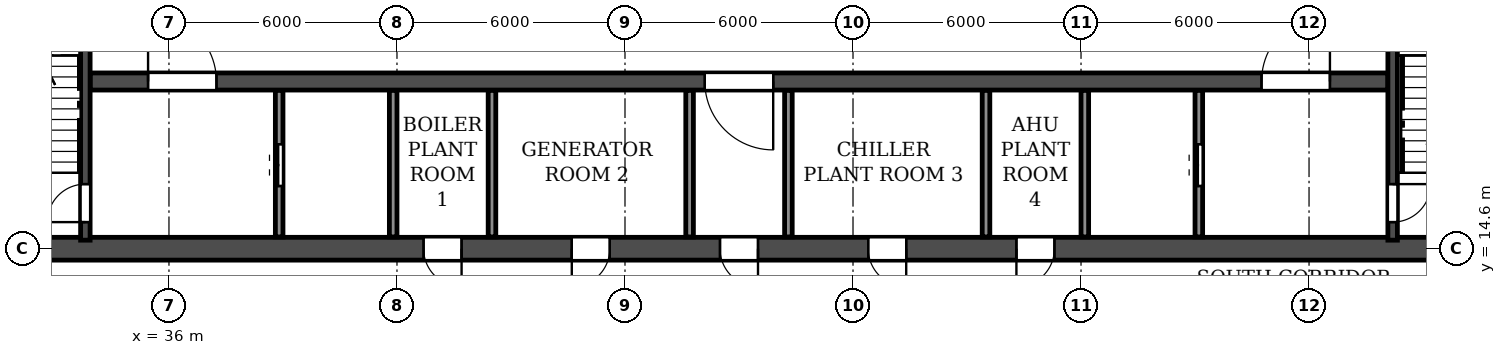
"""IFC4 building model, lengths in metres.
Left out: names, types, materials, properties, quantities, classifications, styles, units other than length and angle.
Written with IfcOpenShell. Run it as: python <this file> out.ifc"""

import sys

from ifc_helpers import new_model, si_unit, direction, frame, frame_2d, origin, place, context, subcontext, project, spatial, rectangle, extrude, element, fill, save


model = new_model("IFC4")
c1 = context("Model", 3, precision=1e-05, world=origin(), true_north=direction((0.0, 1.0)))
c2 = subcontext(c1, "Body", "Model", "MODEL_VIEW")
j1 = project(units=[si_unit("LENGTHUNIT", "METRE"), si_unit("PLANEANGLEUNIT", "RADIAN")], contexts=[c1])
p1 = place(None, origin())
s1 = spatial("IfcSite", under=j1, at=p1, CompositionType="ELEMENT")
p2 = place(p1, origin())
s2 = spatial("IfcBuilding", under=s1, at=p2, CompositionType="ELEMENT")
p3 = place(p2, frame((0.0, 0.0, 165.3)))
s3 = spatial("IfcBuildingStorey", under=s2, at=p3, CompositionType="ELEMENT", Elevation=165.3)
p4 = place(p3, frame((29.7, 14.6, 0.0), z_axis=(0.0, 0.0, 1.0), x_axis=(1.0, 0.0, 0.0)))
e1 = element("IfcWall", 1, at=p4, inside=s3, PredefinedType="SOLIDWALL", context=c2, shape_type="SweptSolid", body=[
    extrude(rectangle(XDim=42.6, YDim=0.6, at=frame_2d((21.3, 0.0))), origin(), (0.0, 0.0, 1.0), 6.38),
])
p5 = place(p4, frame((1.7, 0.0, 0.0)))
e2 = element("IfcOpeningElement", 2, at=p5, cuts=e1, PredefinedType="OPENING", context=c2, shape_type="SweptSolid", body=[
    extrude(rectangle(XDim=1.0, YDim=2.1, at=frame_2d((0.5, 1.05))), frame((0.0, 0.31, 0.0), z_axis=(0.0, -1.0, 0.0), x_axis=(1.0, 0.0, 0.0)), (0.0, 0.0, 1.0), 0.62),
])
p6 = place(p4, frame((13.0, 0.0, 0.0)))
e3 = element("IfcOpeningElement", 3, at=p6, cuts=e1, PredefinedType="OPENING", context=c2, shape_type="SweptSolid", body=[
    extrude(rectangle(XDim=1.0, YDim=2.1, at=frame_2d((0.5, 1.05))), frame((0.0, 0.31, 0.0), z_axis=(0.0, -1.0, 0.0), x_axis=(1.0, 0.0, 0.0)), (0.0, 0.0, 1.0), 0.62),
])
p7 = place(p4, frame((16.9, 0.0, 0.0)))
e4 = element("IfcOpeningElement", 4, at=p7, cuts=e1, PredefinedType="OPENING", context=c2, shape_type="SweptSolid", body=[
    extrude(rectangle(XDim=1.0, YDim=2.1, at=frame_2d((0.5, 1.05))), frame((0.0, 0.31, 0.0), z_axis=(0.0, -1.0, 0.0), x_axis=(1.0, 0.0, 0.0)), (0.0, 0.0, 1.0), 0.62),
])
p8 = place(p4, frame((20.8, 0.0, 0.0)))
e5 = element("IfcOpeningElement", 5, at=p8, cuts=e1, PredefinedType="OPENING", context=c2, shape_type="SweptSolid", body=[
    extrude(rectangle(XDim=1.0, YDim=2.1, at=frame_2d((0.5, 1.05))), frame((0.0, 0.31, 0.0), z_axis=(0.0, -1.0, 0.0), x_axis=(1.0, 0.0, 0.0)), (0.0, 0.0, 1.0), 0.62),
])
p9 = place(p4, frame((24.7, 0.0, 0.0)))
e6 = element("IfcOpeningElement", 6, at=p9, cuts=e1, PredefinedType="OPENING", context=c2, shape_type="SweptSolid", body=[
    extrude(rectangle(XDim=1.0, YDim=2.1, at=frame_2d((0.5, 1.05))), frame((0.0, 0.31, 0.0), z_axis=(0.0, -1.0, 0.0), x_axis=(1.0, 0.0, 0.0)), (0.0, 0.0, 1.0), 0.62),
])
p10 = place(p4, frame((28.6, 0.0, 0.0)))
e7 = element("IfcOpeningElement", 7, at=p10, cuts=e1, PredefinedType="OPENING", context=c2, shape_type="SweptSolid", body=[
    extrude(rectangle(XDim=1.0, YDim=2.1, at=frame_2d((0.5, 1.05))), frame((0.0, 0.31, 0.0), z_axis=(0.0, -1.0, 0.0), x_axis=(1.0, 0.0, 0.0)), (0.0, 0.0, 1.0), 0.62),
])
p11 = place(p4, frame((39.9, 0.0, 0.0)))
e8 = element("IfcOpeningElement", 8, at=p11, cuts=e1, PredefinedType="OPENING", context=c2, shape_type="SweptSolid", body=[
    extrude(rectangle(XDim=1.0, YDim=2.1, at=frame_2d((0.5, 1.05))), frame((0.0, 0.31, 0.0), z_axis=(0.0, -1.0, 0.0), x_axis=(1.0, 0.0, 0.0)), (0.0, 0.0, 1.0), 0.62),
])
p12 = place(p3, frame((33.925, 19.0, 0.0), z_axis=(0.0, 0.0, 1.0), x_axis=(1.0, 0.0, 0.0)))
e9 = element("IfcWall", 9, at=p12, inside=s3, PredefinedType="SOLIDWALL", context=c2, shape_type="SweptSolid", body=[
    extrude(rectangle(XDim=34.15, YDim=0.45, at=frame_2d((17.075, 0.0))), origin(), (0.0, 0.0, 1.0), 6.38),
])
p13 = place(p12, frame((16.175, 0.0, 0.0)))
e10 = element("IfcOpeningElement", 10, at=p13, cuts=e9, PredefinedType="OPENING", context=c2, shape_type="SweptSolid", body=[
    extrude(rectangle(XDim=1.8, YDim=2.1, at=frame_2d((0.9, 1.05))), frame((0.0, 0.235, 0.0), z_axis=(0.0, -1.0, 0.0), x_axis=(1.0, 0.0, 0.0)), (0.0, 0.0, 1.0), 0.47),
])
p14 = place(p12, frame((1.525, 0.0, 0.0)))
e11 = element("IfcOpeningElement", 11, at=p14, cuts=e9, PredefinedType="OPENING", context=c2, shape_type="SweptSolid", body=[
    extrude(rectangle(XDim=1.8, YDim=2.1, at=frame_2d((0.9, 1.05))), frame((0.0, 0.235, 0.0), z_axis=(0.0, -1.0, 0.0), x_axis=(1.0, 0.0, 0.0)), (0.0, 0.0, 1.0), 0.47),
])
p15 = place(p12, frame((30.825, 0.0, 0.0)))
e12 = element("IfcOpeningElement", 12, at=p15, cuts=e9, PredefinedType="OPENING", context=c2, shape_type="SweptSolid", body=[
    extrude(rectangle(XDim=1.8, YDim=2.1, at=frame_2d((0.9, 1.05))), frame((0.0, 0.235, 0.0), z_axis=(0.0, -1.0, 0.0), x_axis=(1.0, 0.0, 0.0)), (0.0, 0.0, 1.0), 0.47),
])
p16 = place(p3, frame((33.8, 14.825, 0.0), z_axis=(0.0, 0.0, 1.0), x_axis=(0.0, 1.0, 0.0)))
e13 = element("IfcWall", 13, at=p16, inside=s3, PredefinedType="SOLIDWALL", context=c2, shape_type="SweptSolid", body=[
    extrude(rectangle(XDim=7.65, YDim=0.25, at=frame_2d((3.825, 0.0))), origin(), (0.0, 0.0, 1.0), 6.38),
])
p17 = place(p16, frame((0.475, 0.0, 0.0)))
e14 = element("IfcOpeningElement", 14, at=p17, cuts=e13, PredefinedType="OPENING", context=c2, shape_type="SweptSolid", body=[
    extrude(rectangle(XDim=1.0, YDim=2.1, at=frame_2d((0.5, 1.05))), frame((0.0, 0.135, 0.0), z_axis=(0.0, -1.0, 0.0), x_axis=(1.0, 0.0, 0.0)), (0.0, 0.0, 1.0), 0.27),
])
p18 = place(p3, frame((68.2, 14.825, 0.0), z_axis=(0.0, 0.0, 1.0), x_axis=(0.0, 1.0, 0.0)))
e15 = element("IfcWall", 15, at=p18, inside=s3, PredefinedType="SOLIDWALL", context=c2, shape_type="SweptSolid", body=[
    extrude(rectangle(XDim=7.65, YDim=0.25, at=frame_2d((3.825, 0.0))), origin(), (0.0, 0.0, 1.0), 6.38),
])
p19 = place(p18, frame((0.475, 0.0, 0.0)))
e16 = element("IfcOpeningElement", 16, at=p19, cuts=e15, PredefinedType="OPENING", context=c2, shape_type="SweptSolid", body=[
    extrude(rectangle(XDim=1.0, YDim=2.1, at=frame_2d((0.5, 1.05))), frame((0.0, 0.135, 0.0), z_axis=(0.0, -1.0, 0.0), x_axis=(1.0, 0.0, 0.0)), (0.0, 0.0, 1.0), 0.27),
])
for number, where, z_axis, x_axis in (
    (17, (44.5, 14.91, 0.0), (0.0, 0.0, 1.0), (0.0, 1.0, 0.0)),
    (18, (49.7, 14.91, 0.0), (0.0, 0.0, 1.0), (0.0, 1.0, 0.0)),
    (19, (52.3, 14.91, 0.0), (0.0, 0.0, 1.0), (0.0, 1.0, 0.0)),
    (20, (57.5, 14.91, 0.0), (0.0, 0.0, 1.0), (0.0, 1.0, 0.0)),
):
    element("IfcWall", number, at=place(p3, frame(where, z_axis=z_axis, x_axis=x_axis)), inside=s3, PredefinedType="PARTITIONING", context=c2, shape_type="SweptSolid", body=[
        extrude(rectangle(XDim=3.855, YDim=0.2, at=frame_2d((1.927, 0.0))), origin(), (0.0, 0.0, 1.0), 6.38),
    ])
p20 = place(p3, frame((38.9, 14.91, 0.0), z_axis=(0.0, 0.0, 1.0), x_axis=(0.0, 1.0, 0.0)))
e21 = element("IfcWall", 21, at=p20, inside=s3, PredefinedType="PARTITIONING", context=c2, shape_type="SweptSolid", body=[
    extrude(rectangle(XDim=3.855, YDim=0.2, at=frame_2d((1.927, 0.0))), origin(), (0.0, 0.0, 1.0), 6.38),
])
p21 = place(p20, frame((1.34, 0.0, 0.0)))
e22 = element("IfcOpeningElement", 22, at=p21, cuts=e21, PredefinedType="OPENING", context=c2, shape_type="SweptSolid", body=[
    extrude(rectangle(XDim=1.1, YDim=2.1, at=frame_2d((0.55, 1.05))), frame((0.0, 0.11, 0.0), z_axis=(0.0, -1.0, 0.0), x_axis=(1.0, 0.0, 0.0)), (0.0, 0.0, 1.0), 0.22),
])
for number, where, z_axis, x_axis in (
    (23, (41.9, 14.91, 0.0), (0.0, 0.0, 1.0), (0.0, 1.0, 0.0)),
    (24, (60.1, 14.91, 0.0), (0.0, 0.0, 1.0), (0.0, 1.0, 0.0)),
):
    element("IfcWall", number, at=place(p3, frame(where, z_axis=z_axis, x_axis=x_axis)), inside=s3, PredefinedType="PARTITIONING", context=c2, shape_type="SweptSolid", body=[
        extrude(rectangle(XDim=3.855, YDim=0.2, at=frame_2d((1.927, 0.0))), origin(), (0.0, 0.0, 1.0), 6.38),
    ])
p22 = place(p3, frame((63.1, 14.91, 0.0), z_axis=(0.0, 0.0, 1.0), x_axis=(0.0, 1.0, 0.0)))
e25 = element("IfcWall", 25, at=p22, inside=s3, PredefinedType="PARTITIONING", context=c2, shape_type="SweptSolid", body=[
    extrude(rectangle(XDim=3.855, YDim=0.2, at=frame_2d((1.927, 0.0))), origin(), (0.0, 0.0, 1.0), 6.38),
])
p23 = place(p22, frame((1.34, 0.0, 0.0)))
e26 = element("IfcOpeningElement", 26, at=p23, cuts=e25, PredefinedType="OPENING", context=c2, shape_type="SweptSolid", body=[
    extrude(rectangle(XDim=1.1, YDim=2.1, at=frame_2d((0.55, 1.05))), frame((0.0, 0.11, 0.0), z_axis=(0.0, -1.0, 0.0), x_axis=(1.0, 0.0, 0.0)), (0.0, 0.0, 1.0), 0.22),
])
p24 = place(p6, frame((1.0, 0.0, 0.0), z_axis=(0.0, 0.0, 1.0), x_axis=(-1.0, 0.0, 0.0)))
e27 = element("IfcDoor", 27, at=p24, inside=s3, OperationType="SINGLE_SWING_LEFT", PredefinedType="DOOR", context=c2, shape_type="SweptSolid", body=[
    extrude(rectangle(XDim=1.0, YDim=2.1, at=frame_2d((0.5, 1.05))), frame((0.0, 0.025, 0.0), z_axis=(0.0, -1.0, 0.0), x_axis=(1.0, 0.0, 0.0)), (0.0, 0.0, 1.0), 0.05),
])
fill(e3, e27)
p25 = place(p7, frame((1.0, 0.0, 0.0), z_axis=(0.0, 0.0, 1.0), x_axis=(-1.0, 0.0, 0.0)))
e28 = element("IfcDoor", 28, at=p25, inside=s3, OperationType="SINGLE_SWING_RIGHT", PredefinedType="DOOR", context=c2, shape_type="SweptSolid", body=[
    extrude(rectangle(XDim=1.0, YDim=2.1, at=frame_2d((0.5, 1.05))), frame((0.0, 0.025, 0.0), z_axis=(0.0, -1.0, 0.0), x_axis=(1.0, 0.0, 0.0)), (0.0, 0.0, 1.0), 0.05),
])
fill(e4, e28)
p26 = place(p8, frame((1.0, 0.0, 0.0), z_axis=(0.0, 0.0, 1.0), x_axis=(-1.0, 0.0, 0.0)))
e29 = element("IfcDoor", 29, at=p26, inside=s3, OperationType="SINGLE_SWING_LEFT", PredefinedType="DOOR", context=c2, shape_type="SweptSolid", body=[
    extrude(rectangle(XDim=1.0, YDim=2.1, at=frame_2d((0.5, 1.05))), frame((0.0, 0.025, 0.0), z_axis=(0.0, -1.0, 0.0), x_axis=(1.0, 0.0, 0.0)), (0.0, 0.0, 1.0), 0.05),
])
fill(e5, e29)
p27 = place(p9, frame((1.0, 0.0, 0.0), z_axis=(0.0, 0.0, 1.0), x_axis=(-1.0, 0.0, 0.0)))
e30 = element("IfcDoor", 30, at=p27, inside=s3, OperationType="SINGLE_SWING_LEFT", PredefinedType="DOOR", context=c2, shape_type="SweptSolid", body=[
    extrude(rectangle(XDim=1.0, YDim=2.1, at=frame_2d((0.5, 1.05))), frame((0.0, 0.025, 0.0), z_axis=(0.0, -1.0, 0.0), x_axis=(1.0, 0.0, 0.0)), (0.0, 0.0, 1.0), 0.05),
])
fill(e6, e30)
p28 = place(p10, frame((1.0, 0.0, 0.0), z_axis=(0.0, 0.0, 1.0), x_axis=(-1.0, 0.0, 0.0)))
e31 = element("IfcDoor", 31, at=p28, inside=s3, OperationType="SINGLE_SWING_RIGHT", PredefinedType="DOOR", context=c2, shape_type="SweptSolid", body=[
    extrude(rectangle(XDim=1.0, YDim=2.1, at=frame_2d((0.5, 1.05))), frame((0.0, 0.025, 0.0), z_axis=(0.0, -1.0, 0.0), x_axis=(1.0, 0.0, 0.0)), (0.0, 0.0, 1.0), 0.05),
])
fill(e7, e31)
p29 = place(p23, origin())
e32 = element("IfcDoor", 32, at=p29, inside=s3, OperationType="DOUBLE_DOOR_SLIDING", PredefinedType="DOOR", context=c2, shape_type="SweptSolid", body=[
    extrude(rectangle(XDim=1.1, YDim=2.1, at=frame_2d((0.55, 1.05))), frame((0.0, 0.025, 0.0), z_axis=(0.0, -1.0, 0.0), x_axis=(1.0, 0.0, 0.0)), (0.0, 0.0, 1.0), 0.05),
])
fill(e26, e32)
p30 = place(p19, frame((1.0, 0.0, 0.0), z_axis=(0.0, 0.0, 1.0), x_axis=(-1.0, 0.0, 0.0)))
e33 = element("IfcDoor", 33, at=p30, inside=s3, OperationType="SINGLE_SWING_LEFT", PredefinedType="DOOR", context=c2, shape_type="SweptSolid", body=[
    extrude(rectangle(XDim=1.0, YDim=2.1, at=frame_2d((0.5, 1.05))), frame((0.0, 0.025, 0.0), z_axis=(0.0, -1.0, 0.0), x_axis=(1.0, 0.0, 0.0)), (0.0, 0.0, 1.0), 0.05),
])
fill(e16, e33)
p31 = place(p17, origin())
e34 = element("IfcDoor", 34, at=p31, inside=s3, OperationType="SINGLE_SWING_LEFT", PredefinedType="DOOR", context=c2, shape_type="SweptSolid", body=[
    extrude(rectangle(XDim=1.0, YDim=2.1, at=frame_2d((0.5, 1.05))), frame((0.0, 0.025, 0.0), z_axis=(0.0, -1.0, 0.0), x_axis=(1.0, 0.0, 0.0)), (0.0, 0.0, 1.0), 0.05),
])
fill(e14, e34)
p32 = place(p21, origin())
e35 = element("IfcDoor", 35, at=p32, inside=s3, OperationType="DOUBLE_DOOR_SLIDING", PredefinedType="DOOR", context=c2, shape_type="SweptSolid", body=[
    extrude(rectangle(XDim=1.1, YDim=2.1, at=frame_2d((0.55, 1.05))), frame((0.0, 0.025, 0.0), z_axis=(0.0, -1.0, 0.0), x_axis=(1.0, 0.0, 0.0)), (0.0, 0.0, 1.0), 0.05),
])
fill(e22, e35)
p33 = place(p13, frame((1.8, 0.0, 0.0), z_axis=(0.0, 0.0, 1.0), x_axis=(-1.0, 0.0, 0.0)))
e36 = element("IfcDoor", 36, at=p33, inside=s3, OperationType="DOUBLE_DOOR_SINGLE_SWING", PredefinedType="DOOR", context=c2, shape_type="SweptSolid", body=[
    extrude(rectangle(XDim=1.8, YDim=2.1, at=frame_2d((0.9, 1.05))), frame((0.0, 0.025, 0.0), z_axis=(0.0, -1.0, 0.0), x_axis=(1.0, 0.0, 0.0)), (0.0, 0.0, 1.0), 0.05),
])
fill(e10, e36)
p34 = place(p14, origin())
e37 = element("IfcDoor", 37, at=p34, inside=s3, OperationType="DOUBLE_DOOR_SINGLE_SWING", PredefinedType="DOOR", context=c2, shape_type="SweptSolid", body=[
    extrude(rectangle(XDim=1.8, YDim=2.1, at=frame_2d((0.9, 1.05))), frame((0.0, 0.025, 0.0), z_axis=(0.0, -1.0, 0.0), x_axis=(1.0, 0.0, 0.0)), (0.0, 0.0, 1.0), 0.05),
])
fill(e11, e37)
p35 = place(p15, origin())
e38 = element("IfcDoor", 38, at=p35, inside=s3, OperationType="DOUBLE_DOOR_SINGLE_SWING", PredefinedType="DOOR", context=c2, shape_type="SweptSolid", body=[
    extrude(rectangle(XDim=1.8, YDim=2.1, at=frame_2d((0.9, 1.05))), frame((0.0, 0.025, 0.0), z_axis=(0.0, -1.0, 0.0), x_axis=(1.0, 0.0, 0.0)), (0.0, 0.0, 1.0), 0.05),
])
fill(e12, e38)
save(model, sys.argv[1])
